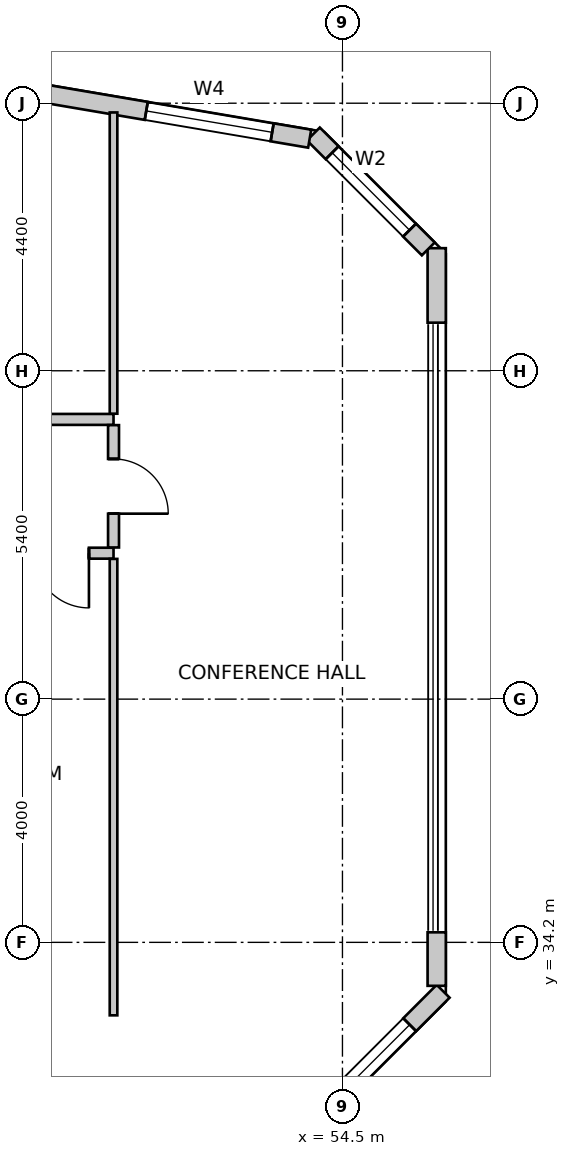
"""IFC4 building model, lengths in metres.
Left out: names, types, materials, properties, quantities, classifications, styles, units other than length and angle.
Written with IfcOpenShell. Run it as: python <this file> out.ifc"""

import sys

from ifc_helpers import new_model, si_unit, direction, frame, frame_2d, origin, place, context, subcontext, project, spatial, rectangle, extrude, source, transform, mapped, element, fill, save


model = new_model("IFC4")
c1 = context("Model", 3, precision=1e-05, world=origin(), true_north=direction((0.0, 1.0)))
c2 = subcontext(c1, "Body", "Model", "MODEL_VIEW")
j1 = project(units=[si_unit("LENGTHUNIT", "METRE"), si_unit("PLANEANGLEUNIT", "RADIAN")], contexts=[c1])
p1 = place(None, origin())
s1 = spatial("IfcSite", under=j1, at=p1, CompositionType="ELEMENT")
p2 = place(p1, origin())
s2 = spatial("IfcBuilding", under=s1, at=p2, CompositionType="ELEMENT")
p3 = place(p2, frame((0.0, 0.0, 95.0)))
s3 = spatial("IfcBuildingStorey", under=s2, at=p3, CompositionType="ELEMENT", Elevation=95.0)
p4 = place(p3, frame((53.076, 30.316, 0.0), z_axis=(0.0, 0.0, 1.0), x_axis=(0.707078757535, 0.707134803727, 0.0)))
e1 = element("IfcWall", 1, at=p4, inside=s3, PredefinedType="SOLIDWALL", context=c2, shape_type="SweptSolid", body=[
    extrude(rectangle(XDim=4.356, YDim=0.3, at=frame_2d((2.178, 0.0))), origin(), (0.0, 0.0, 1.0), 3.7),
])
m1 = source(origin(), c2, "Body", "SweptSolid", [
    extrude(rectangle(XDim=2.8, YDim=2.4, at=frame_2d((1.4, 1.2))), frame((0.0, 0.16, 0.0), z_axis=(0.0, -1.0, 0.0), x_axis=(1.0, 0.0, 0.0)), (0.0, 0.0, 1.0), 0.32),
])
p5 = place(p4, frame((0.778, 0.0, 0.85)))
e2 = element("IfcOpeningElement", 2, at=p5, cuts=e1, PredefinedType="OPENING", context=c2, shape_type="MappedRepresentation", body=[
    mapped(m1, transform((0.0, 0.0, 0.0), scale=1.0)),
])
p6 = place(p3, frame((56.05, 33.485, 0.0), z_axis=(0.0, 0.0, 1.0), x_axis=(0.0, 1.0, 0.0)))
e3 = element("IfcWall", 3, at=p6, inside=s3, PredefinedType="SOLIDWALL", context=c2, shape_type="SweptSolid", body=[
    extrude(rectangle(XDim=0.88, YDim=0.3, at=frame_2d((0.44, 0.0))), origin(), (0.0, 0.0, 1.0), 3.7),
])
p7 = place(p3, frame((56.05, 44.391, 0.0), z_axis=(0.0, 0.0, 1.0), x_axis=(0.0, 1.0, 0.0)))
e4 = element("IfcWall", 4, at=p7, inside=s3, PredefinedType="SOLIDWALL", context=c2, shape_type="SweptSolid", body=[
    extrude(rectangle(XDim=1.225, YDim=0.3, at=frame_2d((0.613, 0.0))), origin(), (0.0, 0.0, 1.0), 3.7),
])
p8 = place(p3, frame((55.912, 45.604, 0.0), z_axis=(0.0, 0.0, 1.0), x_axis=(-0.707152443695, 0.707061115729, 0.0)))
e5 = element("IfcWall", 5, at=p8, inside=s3, PredefinedType="SOLIDWALL", context=c2, shape_type="SweptSolid", body=[
    extrude(rectangle(XDim=2.673, YDim=0.3, at=frame_2d((1.337, 0.0))), origin(), (0.0, 0.0, 1.0), 3.7),
])
m2 = source(origin(), c2, "Body", "SweptSolid", [
    extrude(rectangle(XDim=1.8, YDim=2.1, at=frame_2d((0.9, 1.05))), frame((0.0, 0.16, 0.0), z_axis=(0.0, -1.0, 0.0), x_axis=(1.0, 0.0, 0.0)), (0.0, 0.0, 1.0), 0.32),
])
p9 = place(p8, frame((0.437, 0.0, 0.85)))
e6 = element("IfcOpeningElement", 6, at=p9, cuts=e5, PredefinedType="OPENING", context=c2, shape_type="MappedRepresentation", body=[
    mapped(m2, transform((0.0, 0.0, 0.0), scale=1.0)),
])
p10 = place(p3, frame((53.961, 47.417, 0.0), z_axis=(0.0, 0.0, 1.0), x_axis=(-0.985865713455, 0.167537443678, 0.0)))
e7 = element("IfcWall", 7, at=p10, inside=s3, PredefinedType="SOLIDWALL", context=c2, shape_type="SweptSolid", body=[
    extrude(rectangle(XDim=32.537, YDim=0.3, at=frame_2d((16.269, 0.0))), origin(), (0.0, 0.0, 1.0), 3.7),
])
m3 = source(origin(), c2, "Body", "SweptSolid", [
    extrude(rectangle(XDim=2.1, YDim=2.0, at=frame_2d((1.05, 1.0))), frame((0.0, 0.16, 0.0), z_axis=(0.0, -1.0, 0.0), x_axis=(1.0, 0.0, 0.0)), (0.0, 0.0, 1.0), 0.32),
])
p11 = place(p10, frame((0.626, 0.0, 0.85)))
e8 = element("IfcOpeningElement", 8, at=p11, cuts=e7, PredefinedType="OPENING", context=c2, shape_type="MappedRepresentation", body=[
    mapped(m3, transform((0.0, 0.0, 0.0), scale=1.0)),
])
m4 = source(origin(), c2, "Body", "SweptSolid", [
    extrude(rectangle(XDim=2.4, YDim=2.2, at=frame_2d((1.2, 1.1))), frame((0.0, 0.16, 0.0), z_axis=(0.0, -1.0, 0.0), x_axis=(1.0, 0.0, 0.0)), (0.0, 0.0, 1.0), 0.32),
])
p12 = place(p10, frame((4.504, 0.0, 0.85)))
e9 = element("IfcOpeningElement", 9, at=p12, cuts=e7, PredefinedType="OPENING", context=c2, shape_type="MappedRepresentation", body=[
    mapped(m4, transform((0.0, 0.0, 0.0), scale=1.0)),
])
p13 = place(p10, frame((8.768, 0.0, 0.85)))
e10 = element("IfcOpeningElement", 10, at=p13, cuts=e7, PredefinedType="OPENING", context=c2, shape_type="MappedRepresentation", body=[
    mapped(m1, transform((0.0, 0.0, 0.0), scale=1.0)),
])
p14 = place(p10, frame((14.234, 0.0, 0.85)))
e11 = element("IfcOpeningElement", 11, at=p14, cuts=e7, PredefinedType="OPENING", context=c2, shape_type="MappedRepresentation", body=[
    mapped(m4, transform((0.0, 0.0, 0.0), scale=1.0)),
])
p15 = place(p10, frame((19.222, 0.0, 0.85)))
e12 = element("IfcOpeningElement", 12, at=p15, cuts=e7, PredefinedType="OPENING", context=c2, shape_type="MappedRepresentation", body=[
    mapped(m1, transform((0.0, 0.0, 0.0), scale=1.0)),
])
p16 = place(p10, frame((25.095, 0.0, 0.85)))
e13 = element("IfcOpeningElement", 13, at=p16, cuts=e7, PredefinedType="OPENING", context=c2, shape_type="MappedRepresentation", body=[
    mapped(m4, transform((0.0, 0.0, 0.0), scale=1.0)),
])
p17 = place(p10, frame((29.595, 0.0, 0.85)))
e14 = element("IfcOpeningElement", 14, at=p17, cuts=e7, PredefinedType="OPENING", context=c2, shape_type="MappedRepresentation", body=[
    mapped(m4, transform((0.0, 0.0, 0.0), scale=1.0)),
])
p18 = place(p3, frame((50.735, 40.6, 0.0), z_axis=(0.0, 0.0, 1.0), x_axis=(-1.0, 0.0, 0.0)))
e15 = element("IfcWall", 15, at=p18, inside=s3, PredefinedType="PARTITIONING", context=c2, shape_type="SweptSolid", body=[
    extrude(rectangle(XDim=4.072, YDim=0.18, at=frame_2d((2.036, 0.0))), origin(), (0.0, 0.0, 1.0), 3.075),
])
m5 = source(origin(), c2, "Body", "SweptSolid", [
    extrude(rectangle(XDim=0.9, YDim=2.15, at=frame_2d((0.45, 1.075))), frame((0.0, 0.1, 0.0), z_axis=(0.0, -1.0, 0.0), x_axis=(1.0, 0.0, 0.0)), (0.0, 0.0, 1.0), 0.2),
])
p19 = place(p18, frame((0.404, 0.0, 0.0)))
e16 = element("IfcOpeningElement", 16, at=p19, cuts=e15, PredefinedType="OPENING", context=c2, shape_type="MappedRepresentation", body=[
    mapped(m5, transform((0.0, 0.0, 0.0), scale=1.0)),
])
p20 = place(p3, frame((41.662, 42.8, 0.0), z_axis=(0.0, 0.0, 1.0), x_axis=(1.0, 0.0, 0.0)))
e17 = element("IfcWall", 17, at=p20, inside=s3, PredefinedType="PARTITIONING", context=c2, shape_type="SweptSolid", body=[
    extrude(rectangle(XDim=9.073, YDim=0.18, at=frame_2d((4.537, 0.0))), origin(), (0.0, 0.0, 1.0), 3.075),
])
p21 = place(p20, frame((4.026, 0.0, 0.0)))
e18 = element("IfcOpeningElement", 18, at=p21, cuts=e17, PredefinedType="OPENING", context=c2, shape_type="MappedRepresentation", body=[
    mapped(m5, transform((0.0, 0.0, 0.0), scale=1.0)),
])
p22 = place(p3, frame((50.735, 42.706, 0.0), z_axis=(0.0, 0.0, 1.0), x_axis=(0.0, -1.0, 0.0)))
e19 = element("IfcWall", 19, at=p22, inside=s3, PredefinedType="PARTITIONING", context=c2, shape_type="SweptSolid", body=[
    extrude(rectangle(XDim=2.012, YDim=0.18, at=frame_2d((1.006, 0.0))), origin(), (0.0, 0.0, 1.0), 3.7),
])
p23 = place(p22, frame((0.556, 0.0, 0.0)))
e20 = element("IfcOpeningElement", 20, at=p23, cuts=e19, PredefinedType="OPENING", context=c2, shape_type="MappedRepresentation", body=[
    mapped(m5, transform((0.0, 0.0, 0.0), scale=1.0)),
])
p24 = place(p3, frame((50.735, 40.506, 0.0), z_axis=(0.0, 0.0, 1.0), x_axis=(0.0, -1.0, 0.0)))
e21 = element("IfcWall", 21, at=p24, inside=s3, PredefinedType="PARTITIONING", context=c2, shape_type="SweptSolid", body=[
    extrude(rectangle(XDim=7.506, YDim=0.125, at=frame_2d((3.753, 0.0))), origin(), (0.0, 0.0, 1.0), 3.7),
])
p25 = place(p3, frame((50.735, 47.848, 0.0), z_axis=(0.0, 0.0, 1.0), x_axis=(0.0, -1.0, 0.0)))
e22 = element("IfcWall", 22, at=p25, inside=s3, PredefinedType="PARTITIONING", context=c2, shape_type="SweptSolid", body=[
    extrude(rectangle(XDim=4.954, YDim=0.125, at=frame_2d((2.477, 0.0))), origin(), (0.0, 0.0, 1.0), 3.7),
])
m6 = source(origin(), c2, "Body", "SweptSolid", [
    extrude(rectangle(XDim=2.8, YDim=2.4, at=frame_2d((1.4, 1.2))), frame((0.0, -0.015, 0.0), z_axis=(0.0, -1.0, 0.0), x_axis=(1.0, 0.0, 0.0)), (0.0, 0.0, 1.0), 0.06),
])
p26 = place(p5, origin())
e23 = element("IfcWindow", 23, at=p26, inside=s3, PartitioningType="SINGLE_PANEL", PredefinedType="WINDOW", context=c2, shape_type="MappedRepresentation", body=[
    mapped(m6, transform((0.0, 0.0, 0.0), scale=1.0)),
])
fill(e2, e23)
m7 = source(origin(), c2, "Body", "SweptSolid", [
    extrude(rectangle(XDim=1.8, YDim=2.1, at=frame_2d((0.9, 1.05))), frame((0.0, -0.015, 0.0), z_axis=(0.0, -1.0, 0.0), x_axis=(1.0, 0.0, 0.0)), (0.0, 0.0, 1.0), 0.06),
])
p27 = place(p9, origin())
e24 = element("IfcWindow", 24, at=p27, inside=s3, PartitioningType="SINGLE_PANEL", PredefinedType="WINDOW", context=c2, shape_type="MappedRepresentation", body=[
    mapped(m7, transform((0.0, 0.0, 0.0), scale=1.0)),
])
fill(e6, e24)
m8 = source(origin(), c2, "Body", "SweptSolid", [
    extrude(rectangle(XDim=2.1, YDim=2.0, at=frame_2d((1.05, 1.0))), frame((0.0, -0.015, 0.0), z_axis=(0.0, -1.0, 0.0), x_axis=(1.0, 0.0, 0.0)), (0.0, 0.0, 1.0), 0.06),
])
p28 = place(p11, origin())
e25 = element("IfcWindow", 25, at=p28, inside=s3, PartitioningType="SINGLE_PANEL", PredefinedType="WINDOW", context=c2, shape_type="MappedRepresentation", body=[
    mapped(m8, transform((0.0, 0.0, 0.0), scale=1.0)),
])
fill(e8, e25)
m9 = source(origin(), c2, "Body", "SweptSolid", [
    extrude(rectangle(XDim=0.9, YDim=2.15, at=frame_2d((0.45, 1.075))), frame((0.0, 0.025, 0.0), z_axis=(0.0, -1.0, 0.0), x_axis=(1.0, 0.0, 0.0)), (0.0, 0.0, 1.0), 0.05),
])
p29 = place(p19, origin())
e26 = element("IfcDoor", 26, at=p29, inside=s3, OperationType="SINGLE_SWING_LEFT", PredefinedType="DOOR", context=c2, shape_type="MappedRepresentation", body=[
    mapped(m9, transform((0.0, 0.0, 0.0), scale=1.0)),
])
fill(e16, e26)
p30 = place(p23, origin())
e27 = element("IfcDoor", 27, at=p30, inside=s3, OperationType="SINGLE_SWING_RIGHT", PredefinedType="DOOR", context=c2, shape_type="MappedRepresentation", body=[
    mapped(m9, transform((0.0, 0.0, 0.0), scale=1.0)),
])
fill(e20, e27)
save(model, sys.argv[1])
